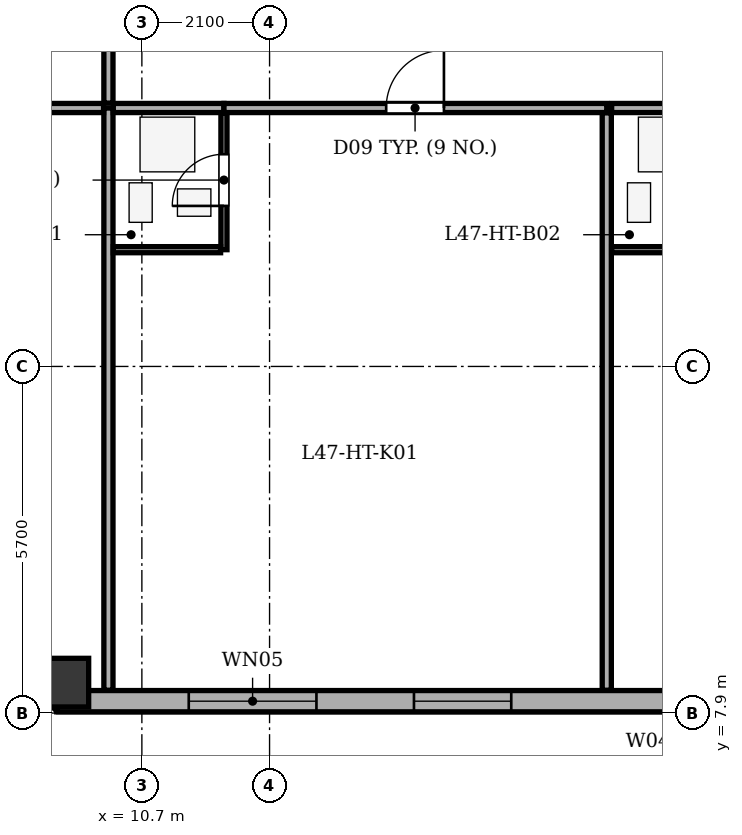
"""IFC4 building model, lengths in metres.
Left out: names, types, materials, properties, quantities, classifications, styles, units other than length and angle.
Written with IfcOpenShell. Run it as: python <this file> out.ifc"""

import sys

from ifc_helpers import new_model, si_unit, direction, frame, frame_2d, origin, origin_2d, place, context, subcontext, project, spatial, rectangle, extrude, element, fill, save


model = new_model("IFC4")
c1 = context("Model", 3, precision=1e-05, world=origin(), true_north=direction((0.0, 1.0)))
c2 = subcontext(c1, "Body", "Model", "MODEL_VIEW")
j1 = project(units=[si_unit("LENGTHUNIT", "METRE"), si_unit("PLANEANGLEUNIT", "RADIAN")], contexts=[c1])
p1 = place(None, origin())
s1 = spatial("IfcSite", under=j1, at=p1, CompositionType="ELEMENT")
p2 = place(p1, origin())
s2 = spatial("IfcBuilding", under=s1, at=p2, CompositionType="ELEMENT")
p3 = place(p2, frame((0.0, 0.0, 183.3)))
s3 = spatial("IfcBuildingStorey", under=s2, at=p3, CompositionType="ELEMENT", Elevation=183.3)
p4 = place(p3, frame((9.3, 8.4, 0.0), z_axis=(0.0, 0.0, 1.0), x_axis=(1.0, 0.0, 0.0)))
e1 = element("IfcColumn", 1, at=p4, inside=s3, PredefinedType="COLUMN", context=c2, shape_type="SweptSolid", body=[
    extrude(rectangle(XDim=0.8, YDim=1.05, at=origin_2d()), origin(), (0.0, 0.0, 1.0), 3.5),
])
p5 = place(p3, frame((44.3, 8.095, 0.0), z_axis=(0.0, 0.0, 1.0), x_axis=(-1.0, 0.0, 0.0)))
e2 = element("IfcWall", 2, at=p5, inside=s3, PredefinedType="STANDARD", context=c2, shape_type="SweptSolid", body=[
    extrude(rectangle(XDim=35.0, YDim=0.35, at=frame_2d((17.5, 0.0))), origin(), (0.0, 0.0, 1.0), 2.785),
])
p6 = place(p5, frame((19.6, 0.0, 0.0)))
e3 = element("IfcOpeningElement", 3, at=p6, cuts=e2, PredefinedType="OPENING", context=c2, shape_type="SweptSolid", body=[
    extrude(rectangle(XDim=1.0, YDim=2.02, at=frame_2d((0.5, 1.01))), frame((0.0, 0.185, 0.0), z_axis=(0.0, -1.0, 0.0), x_axis=(1.0, 0.0, 0.0)), (0.0, 0.0, 1.0), 0.37),
])
p7 = place(p5, frame((1.686, 0.0, 0.75)))
e4 = element("IfcOpeningElement", 4, at=p7, cuts=e2, PredefinedType="OPENING", context=c2, shape_type="SweptSolid", body=[
    extrude(rectangle(XDim=1.6, YDim=1.75, at=frame_2d((0.8, 0.875))), frame((0.0, 0.185, 0.0), z_axis=(0.0, -1.0, 0.0), x_axis=(1.0, 0.0, 0.0)), (0.0, 0.0, 1.0), 0.37),
])
p8 = place(p5, frame((4.843, 0.0, 0.75)))
e5 = element("IfcOpeningElement", 5, at=p8, cuts=e2, PredefinedType="OPENING", context=c2, shape_type="SweptSolid", body=[
    extrude(rectangle(XDim=1.6, YDim=1.75, at=frame_2d((0.8, 0.875))), frame((0.0, 0.185, 0.0), z_axis=(0.0, -1.0, 0.0), x_axis=(1.0, 0.0, 0.0)), (0.0, 0.0, 1.0), 0.37),
])
p9 = place(p5, frame((10.496, 0.0, 0.75)))
e6 = element("IfcOpeningElement", 6, at=p9, cuts=e2, PredefinedType="OPENING", context=c2, shape_type="SweptSolid", body=[
    extrude(rectangle(XDim=1.6, YDim=1.75, at=frame_2d((0.8, 0.875))), frame((0.0, 0.185, 0.0), z_axis=(0.0, -1.0, 0.0), x_axis=(1.0, 0.0, 0.0)), (0.0, 0.0, 1.0), 0.37),
])
p10 = place(p5, frame((13.304, 0.0, 0.75)))
e7 = element("IfcOpeningElement", 7, at=p10, cuts=e2, PredefinedType="OPENING", context=c2, shape_type="SweptSolid", body=[
    extrude(rectangle(XDim=1.6, YDim=1.75, at=frame_2d((0.8, 0.875))), frame((0.0, 0.185, 0.0), z_axis=(0.0, -1.0, 0.0), x_axis=(1.0, 0.0, 0.0)), (0.0, 0.0, 1.0), 0.37),
])
p11 = place(p5, frame((27.525, 0.0, 0.75)))
e8 = element("IfcOpeningElement", 8, at=p11, cuts=e2, PredefinedType="OPENING", context=c2, shape_type="SweptSolid", body=[
    extrude(rectangle(XDim=1.6, YDim=1.75, at=frame_2d((0.8, 0.875))), frame((0.0, 0.185, 0.0), z_axis=(0.0, -1.0, 0.0), x_axis=(1.0, 0.0, 0.0)), (0.0, 0.0, 1.0), 0.37),
])
p12 = place(p5, frame((30.729, 0.0, 0.75)))
e9 = element("IfcOpeningElement", 9, at=p12, cuts=e2, PredefinedType="OPENING", context=c2, shape_type="SweptSolid", body=[
    extrude(rectangle(XDim=2.1, YDim=1.75, at=frame_2d((1.05, 0.875))), frame((0.0, 0.185, 0.0), z_axis=(0.0, -1.0, 0.0), x_axis=(1.0, 0.0, 0.0)), (0.0, 0.0, 1.0), 0.37),
])
p13 = place(p3, frame((9.3, 8.095, 0.0), z_axis=(0.0, 0.0, 1.0), x_axis=(-0.707106781187, 0.707106781187, 0.0)))
e10 = element("IfcWall", 10, at=p13, inside=s3, PredefinedType="STANDARD", context=c2, shape_type="SweptSolid", body=[
    extrude(rectangle(XDim=6.795, YDim=0.35, at=frame_2d((3.397, 0.0))), origin(), (0.0, 0.0, 1.0), 2.785),
])
p14 = place(p13, frame((2.698, 0.0, 0.75)))
e11 = element("IfcOpeningElement", 11, at=p14, cuts=e10, PredefinedType="OPENING", context=c2, shape_type="SweptSolid", body=[
    extrude(rectangle(XDim=1.4, YDim=1.65, at=frame_2d((0.7, 0.825))), frame((0.0, 0.185, 0.0), z_axis=(0.0, -1.0, 0.0), x_axis=(1.0, 0.0, 0.0)), (0.0, 0.0, 1.0), 0.37),
])
p15 = place(p3, frame((10.15, 8.275, 0.0), z_axis=(0.0, 0.0, 1.0), x_axis=(0.0, 1.0, 0.0)))
e12 = element("IfcWall", 12, at=p15, inside=s3, PredefinedType="PARTITIONING", context=c2, shape_type="SweptSolid", body=[
    extrude(rectangle(XDim=9.575, YDim=0.15, at=frame_2d((4.788, 0.0))), origin(), (0.0, 0.0, 1.0), 3.2),
])
p16 = place(p3, frame((10.23, 17.85, 0.0), z_axis=(0.0, 0.0, 1.0), x_axis=(1.0, 0.0, 0.0)))
e13 = element("IfcWall", 13, at=p16, inside=s3, PredefinedType="PARTITIONING", context=c2, shape_type="SweptSolid", body=[
    extrude(rectangle(XDim=1.82, YDim=0.15, at=frame_2d((0.91, 0.0))), origin(), (0.0, 0.0, 1.0), 3.2),
])
p17 = place(p3, frame((12.05, 17.85, 0.0), z_axis=(0.0, 0.0, 1.0), x_axis=(1.0, 0.0, 0.0)))
e14 = element("IfcWall", 14, at=p17, inside=s3, PredefinedType="PARTITIONING", context=c2, shape_type="SweptSolid", body=[
    extrude(rectangle(XDim=6.296, YDim=0.15, at=frame_2d((3.148, 0.0))), origin(), (0.0, 0.0, 1.0), 3.2),
])
p18 = place(p17, frame((2.668, 0.0, 0.0)))
e15 = element("IfcOpeningElement", 15, at=p18, cuts=e14, PredefinedType="OPENING", context=c2, shape_type="SweptSolid", body=[
    extrude(rectangle(XDim=0.95, YDim=2.1, at=frame_2d((0.475, 1.05))), frame((0.0, 0.085, 0.0), z_axis=(0.0, -1.0, 0.0), x_axis=(1.0, 0.0, 0.0)), (0.0, 0.0, 1.0), 0.17),
])
p19 = place(p3, frame((12.05, 15.52, 0.0), z_axis=(0.0, 0.0, 1.0), x_axis=(0.0, 1.0, 0.0)))
e16 = element("IfcWall", 16, at=p19, inside=s3, PredefinedType="PARTITIONING", context=c2, shape_type="SweptSolid", body=[
    extrude(rectangle(XDim=2.25, YDim=0.1, at=frame_2d((1.125, 0.0))), origin(), (0.0, 0.0, 1.0), 3.2),
])
p20 = place(p19, frame((0.72, 0.0, 0.0)))
e17 = element("IfcOpeningElement", 17, at=p20, cuts=e16, PredefinedType="OPENING", context=c2, shape_type="SweptSolid", body=[
    extrude(rectangle(XDim=0.85, YDim=2.05, at=frame_2d((0.425, 1.025))), frame((0.0, 0.06, 0.0), z_axis=(0.0, -1.0, 0.0), x_axis=(1.0, 0.0, 0.0)), (0.0, 0.0, 1.0), 0.12),
])
p21 = place(p3, frame((10.23, 15.52, 0.0), z_axis=(0.0, 0.0, 1.0), x_axis=(1.0, 0.0, 0.0)))
e18 = element("IfcWall", 18, at=p21, inside=s3, PredefinedType="PARTITIONING", context=c2, shape_type="SweptSolid", body=[
    extrude(rectangle(XDim=1.765, YDim=0.1, at=frame_2d((0.883, 0.0))), origin(), (0.0, 0.0, 1.0), 3.2),
])
p22 = place(p3, frame((18.346, 8.275, 0.0), z_axis=(0.0, 0.0, 1.0), x_axis=(0.0, 1.0, 0.0)))
e19 = element("IfcWall", 19, at=p22, inside=s3, PredefinedType="PARTITIONING", context=c2, shape_type="SweptSolid", body=[
    extrude(rectangle(XDim=9.495, YDim=0.15, at=frame_2d((4.748, 0.0))), origin(), (0.0, 0.0, 1.0), 3.2),
])
p23 = place(p3, frame((18.426, 17.85, 0.0), z_axis=(0.0, 0.0, 1.0), x_axis=(1.0, 0.0, 0.0)))
e20 = element("IfcWall", 20, at=p23, inside=s3, PredefinedType="PARTITIONING", context=c2, shape_type="SweptSolid", body=[
    extrude(rectangle(XDim=1.82, YDim=0.15, at=frame_2d((0.91, 0.0))), origin(), (0.0, 0.0, 1.0), 3.2),
])
p24 = place(p3, frame((18.426, 15.52, 0.0), z_axis=(0.0, 0.0, 1.0), x_axis=(1.0, 0.0, 0.0)))
e21 = element("IfcWall", 21, at=p24, inside=s3, PredefinedType="PARTITIONING", context=c2, shape_type="SweptSolid", body=[
    extrude(rectangle(XDim=1.765, YDim=0.1, at=frame_2d((0.882, 0.0))), origin(), (0.0, 0.0, 1.0), 3.2),
])
p25 = place(p3, frame((4.675, 17.85, 0.0), z_axis=(0.0, 0.0, 1.0), x_axis=(1.0, 0.0, 0.0)))
e22 = element("IfcWall", 22, at=p25, inside=s3, PredefinedType="PARTITIONING", context=c2, shape_type="SweptSolid", body=[
    extrude(rectangle(XDim=5.395, YDim=0.15, at=frame_2d((2.698, 0.0))), origin(), (0.0, 0.0, 1.0), 3.2),
])
p26 = place(p3, frame((10.15, 17.93, 0.0), z_axis=(0.0, 0.0, 1.0), x_axis=(0.0, 1.0, 0.0)))
e23 = element("IfcWall", 23, at=p26, inside=s3, PredefinedType="PARTITIONING", context=c2, shape_type="SweptSolid", body=[
    extrude(rectangle(XDim=18.54, YDim=0.15, at=frame_2d((9.27, 0.0))), origin(), (0.0, 0.0, 1.0), 3.2),
])
p27 = place(p26, frame((8.79, 0.0, 0.0)))
e24 = element("IfcOpeningElement", 24, at=p27, cuts=e23, PredefinedType="OPENING", context=c2, shape_type="SweptSolid", body=[
    extrude(rectangle(XDim=0.95, YDim=2.1, at=frame_2d((0.475, 1.05))), frame((0.0, 0.085, 0.0), z_axis=(0.0, -1.0, 0.0), x_axis=(1.0, 0.0, 0.0)), (0.0, 0.0, 1.0), 0.17),
])
p28 = place(p11, origin())
e25 = element("IfcWindow", 25, at=p28, inside=s3, PartitioningType="SINGLE_PANEL", PredefinedType="WINDOW", context=c2, shape_type="SweptSolid", body=[
    extrude(rectangle(XDim=1.6, YDim=1.75, at=frame_2d((0.8, 0.875))), frame((0.0, -0.01, 0.0), z_axis=(0.0, -1.0, 0.0), x_axis=(1.0, 0.0, 0.0)), (0.0, 0.0, 1.0), 0.06),
])
fill(e8, e25)
p29 = place(p12, origin())
e26 = element("IfcWindow", 26, at=p29, inside=s3, PartitioningType="SINGLE_PANEL", PredefinedType="WINDOW", context=c2, shape_type="SweptSolid", body=[
    extrude(rectangle(XDim=2.1, YDim=1.75, at=frame_2d((1.05, 0.875))), frame((0.0, -0.01, 0.0), z_axis=(0.0, -1.0, 0.0), x_axis=(1.0, 0.0, 0.0)), (0.0, 0.0, 1.0), 0.06),
])
fill(e9, e26)
p30 = place(p20, origin())
e27 = element("IfcDoor", 27, at=p30, inside=s3, OperationType="SINGLE_SWING_LEFT", PredefinedType="DOOR", context=c2, shape_type="SweptSolid", body=[
    extrude(rectangle(XDim=0.85, YDim=2.05, at=frame_2d((0.425, 1.025))), frame((0.0, 0.025, 0.0), z_axis=(0.0, -1.0, 0.0), x_axis=(1.0, 0.0, 0.0)), (0.0, 0.0, 1.0), 0.05),
])
fill(e17, e27)
p31 = place(p18, origin())
e28 = element("IfcDoor", 28, at=p31, inside=s3, OperationType="SINGLE_SWING_RIGHT", PredefinedType="DOOR", context=c2, shape_type="SweptSolid", body=[
    extrude(rectangle(XDim=0.95, YDim=2.1, at=frame_2d((0.475, 1.05))), frame((0.0, 0.025, 0.0), z_axis=(0.0, -1.0, 0.0), x_axis=(1.0, 0.0, 0.0)), (0.0, 0.0, 1.0), 0.05),
])
fill(e15, e28)
save(model, sys.argv[1])
